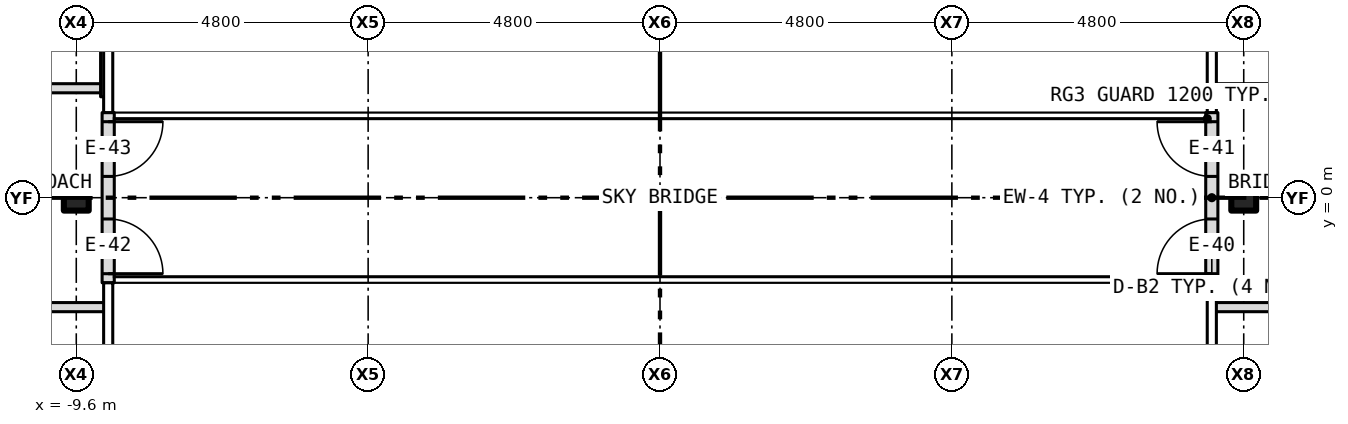
"""IFC4 building model, lengths in metres.
Left out: names, types, materials, properties, quantities, classifications, styles, units other than length and angle.
Written with IfcOpenShell. Run it as: python <this file> out.ifc"""

import sys

from ifc_helpers import new_model, si_unit, direction, frame, frame_2d, origin, origin_2d, place, context, subcontext, project, spatial, rectangle, i_section, extrude, element, fill, save


model = new_model("IFC4")
c1 = context("Model", 3, precision=1e-05, world=origin(), true_north=direction((0.0, 1.0)))
c2 = subcontext(c1, "Body", "Model", "MODEL_VIEW")
j1 = project(units=[si_unit("LENGTHUNIT", "METRE"), si_unit("PLANEANGLEUNIT", "RADIAN")], contexts=[c1])
p1 = place(None, origin())
s1 = spatial("IfcSite", under=j1, at=p1, CompositionType="ELEMENT")
p2 = place(p1, origin())
s2 = spatial("IfcBuilding", under=s1, at=p2, CompositionType="ELEMENT")
p3 = place(p2, frame((0.0, 0.0, 81.0)))
s3 = spatial("IfcBuildingStorey", under=s2, at=p3, CompositionType="ELEMENT", Elevation=81.0)
for number, where, z_axis, x_axis in (
    (1, (-9.6, 0.0, -0.15), (0.0, 0.0, 1.0), (1.0, 0.0, 0.0)),
    (2, (9.6, 0.0, -0.15), (0.0, 0.0, 1.0), (1.0, 0.0, 0.0)),
):
    element("IfcColumn", number, at=place(p3, frame(where, z_axis=z_axis, x_axis=x_axis)), inside=s3, PredefinedType="COLUMN", context=c2, shape_type="SweptSolid", body=[
        extrude(i_section(OverallWidth=0.409, OverallDepth=0.424, WebThickness=0.033, FlangeThickness=0.052, at=origin_2d()), origin(), (0.0, 0.0, 1.0), 3.35),
    ])
p4 = place(p3, frame((9.075, -1.4, 0.0), z_axis=(0.0, 0.0, 1.0), x_axis=(0.0, 1.0, 0.0)))
e3 = element("IfcWall", 3, at=p4, inside=s3, PredefinedType="SOLIDWALL", context=c2, shape_type="SweptSolid", body=[
    extrude(rectangle(XDim=2.8, YDim=0.2, at=frame_2d((1.4, 0.0))), origin(), (0.0, 0.0, 1.0), 3.5),
])
p5 = place(p4, frame((0.15, 0.0, 0.0)))
e4 = element("IfcOpeningElement", 4, at=p5, cuts=e3, PredefinedType="OPENING", context=c2, shape_type="SweptSolid", body=[
    extrude(rectangle(XDim=0.9, YDim=2.1, at=frame_2d((0.45, 1.05))), frame((0.0, 0.112, 0.0), z_axis=(0.0, -1.0, 0.0), x_axis=(1.0, 0.0, 0.0)), (0.0, 0.0, 1.0), 0.224),
])
p6 = place(p4, frame((1.75, 0.0, 0.0)))
e5 = element("IfcOpeningElement", 5, at=p6, cuts=e3, PredefinedType="OPENING", context=c2, shape_type="SweptSolid", body=[
    extrude(rectangle(XDim=0.9, YDim=2.1, at=frame_2d((0.45, 1.05))), frame((0.0, 0.112, 0.0), z_axis=(0.0, -1.0, 0.0), x_axis=(1.0, 0.0, 0.0)), (0.0, 0.0, 1.0), 0.224),
])
p7 = place(p3, frame((-9.075, -1.4, 0.0), z_axis=(0.0, 0.0, 1.0), x_axis=(0.0, 1.0, 0.0)))
e6 = element("IfcWall", 6, at=p7, inside=s3, PredefinedType="SOLIDWALL", context=c2, shape_type="SweptSolid", body=[
    extrude(rectangle(XDim=2.8, YDim=0.2, at=frame_2d((1.4, 0.0))), origin(), (0.0, 0.0, 1.0), 3.5),
])
p8 = place(p7, frame((0.15, 0.0, 0.0)))
e7 = element("IfcOpeningElement", 7, at=p8, cuts=e6, PredefinedType="OPENING", context=c2, shape_type="SweptSolid", body=[
    extrude(rectangle(XDim=0.9, YDim=2.1, at=frame_2d((0.45, 1.05))), frame((0.0, 0.112, 0.0), z_axis=(0.0, -1.0, 0.0), x_axis=(1.0, 0.0, 0.0)), (0.0, 0.0, 1.0), 0.224),
])
p9 = place(p7, frame((1.75, 0.0, 0.0)))
e8 = element("IfcOpeningElement", 8, at=p9, cuts=e6, PredefinedType="OPENING", context=c2, shape_type="SweptSolid", body=[
    extrude(rectangle(XDim=0.9, YDim=2.1, at=frame_2d((0.45, 1.05))), frame((0.0, 0.112, 0.0), z_axis=(0.0, -1.0, 0.0), x_axis=(1.0, 0.0, 0.0)), (0.0, 0.0, 1.0), 0.224),
])
for number, where, z_axis, x_axis in (
    (9, (-12.4, -1.8, 0.0), (0.0, 0.0, 1.0), (1.0, 0.0, 0.0)),
    (10, (9.12, -1.8, 0.0), (0.0, 0.0, 1.0), (1.0, 0.0, 0.0)),
):
    element("IfcWall", number, at=place(p3, frame(where, z_axis=z_axis, x_axis=x_axis)), inside=s3, PredefinedType="PARTITIONING", context=c2, shape_type="SweptSolid", body=[
        extrude(rectangle(XDim=3.28, YDim=0.15, at=frame_2d((1.64, 0.0))), origin(), (0.0, 0.0, 1.0), 3.2),
    ])
p10 = place(p3, frame((-12.4, 1.8, 0.0), z_axis=(0.0, 0.0, 1.0), x_axis=(1.0, 0.0, 0.0)))
e11 = element("IfcWall", 11, at=p10, inside=s3, PredefinedType="PARTITIONING", context=c2, shape_type="SweptSolid", body=[
    extrude(rectangle(XDim=3.25, YDim=0.15, at=frame_2d((1.625, 0.0))), origin(), (0.0, 0.0, 1.0), 3.2),
])
p11 = place(p3, frame((9.12, 1.8, 0.0), z_axis=(0.0, 0.0, 1.0), x_axis=(1.0, 0.0, 0.0)))
e12 = element("IfcWall", 12, at=p11, inside=s3, PredefinedType="PARTITIONING", context=c2, shape_type="SweptSolid", body=[
    extrude(rectangle(XDim=3.28, YDim=0.15, at=frame_2d((1.64, 0.0))), origin(), (0.0, 0.0, 1.0), 3.2),
])
p12 = place(p3, frame((-9.15, 1.66, 0.0), z_axis=(0.0, 0.0, 1.0), x_axis=(0.0, 1.0, 0.0)))
e13 = element("IfcWall", 13, at=p12, inside=s3, PredefinedType="PARTITIONING", context=c2, shape_type="SweptSolid", body=[
    extrude(rectangle(XDim=4.38, YDim=0.1, at=frame_2d((2.19, 0.0))), origin(), (0.0, 0.0, 1.0), 3.2),
])
p13 = place(p5, origin())
e14 = element("IfcDoor", 14, at=p13, inside=s3, OperationType="SINGLE_SWING_LEFT", PredefinedType="DOOR", context=c2, shape_type="SweptSolid", body=[
    extrude(rectangle(XDim=0.9, YDim=2.1, at=frame_2d((0.45, 1.05))), frame((0.0, 0.025, 0.0), z_axis=(0.0, -1.0, 0.0), x_axis=(1.0, 0.0, 0.0)), (0.0, 0.0, 1.0), 0.05),
])
fill(e4, e14)
p14 = place(p6, origin())
e15 = element("IfcDoor", 15, at=p14, inside=s3, OperationType="SINGLE_SWING_RIGHT", PredefinedType="DOOR", context=c2, shape_type="SweptSolid", body=[
    extrude(rectangle(XDim=0.9, YDim=2.1, at=frame_2d((0.45, 1.05))), frame((0.0, 0.025, 0.0), z_axis=(0.0, -1.0, 0.0), x_axis=(1.0, 0.0, 0.0)), (0.0, 0.0, 1.0), 0.05),
])
fill(e5, e15)
p15 = place(p8, origin())
e16 = element("IfcDoor", 16, at=p15, inside=s3, OperationType="SINGLE_SWING_LEFT", PredefinedType="DOOR", context=c2, shape_type="SweptSolid", body=[
    extrude(rectangle(XDim=0.9, YDim=2.1, at=frame_2d((0.45, 1.05))), frame((0.0, 0.025, 0.0), z_axis=(0.0, -1.0, 0.0), x_axis=(1.0, 0.0, 0.0)), (0.0, 0.0, 1.0), 0.05),
])
fill(e7, e16)
p16 = place(p9, origin())
e17 = element("IfcDoor", 17, at=p16, inside=s3, OperationType="SINGLE_SWING_RIGHT", PredefinedType="DOOR", context=c2, shape_type="SweptSolid", body=[
    extrude(rectangle(XDim=0.9, YDim=2.1, at=frame_2d((0.45, 1.05))), frame((0.0, 0.025, 0.0), z_axis=(0.0, -1.0, 0.0), x_axis=(1.0, 0.0, 0.0)), (0.0, 0.0, 1.0), 0.05),
])
fill(e8, e17)
save(model, sys.argv[1])
